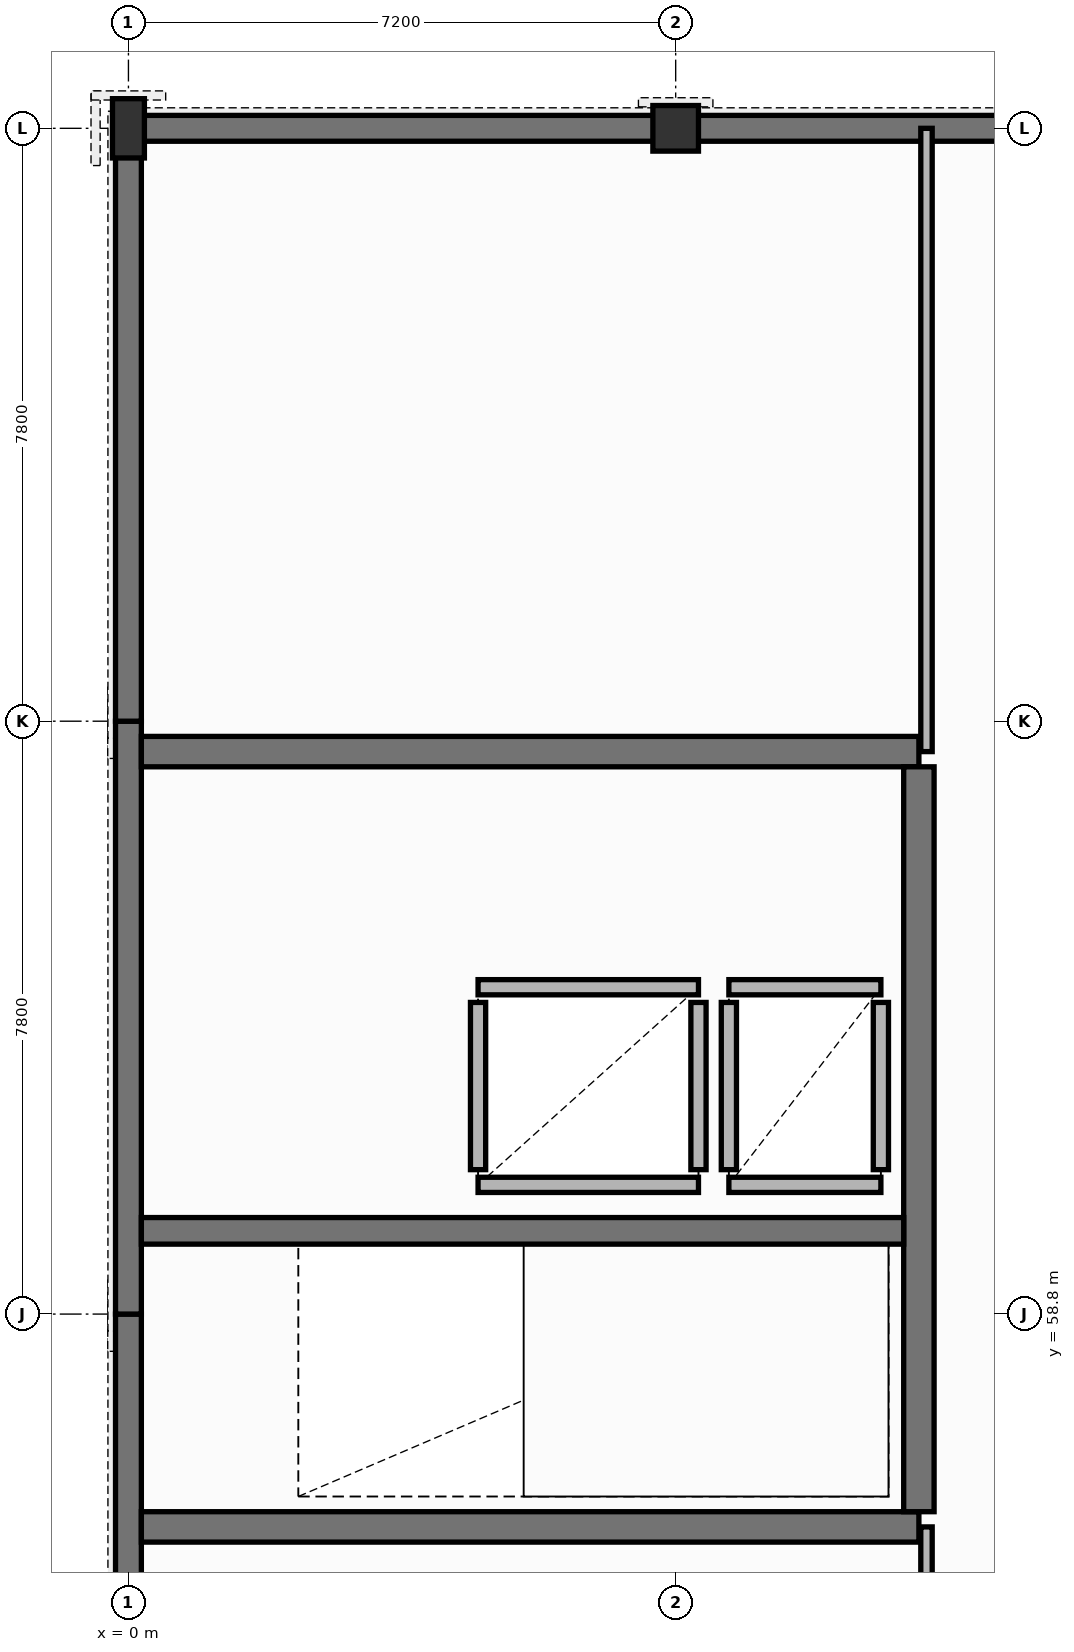
"""IFC4 building model, lengths in metres.
Left out: names, types, materials, properties, quantities, classifications, styles, units other than length and angle.
Written with IfcOpenShell. Run it as: python <this file> out.ifc"""

import sys

from ifc_helpers import new_model, si_unit, direction, frame, frame_2d, origin, origin_2d, place, context, subcontext, project, spatial, rectangle, extrude, element, fill, save


model = new_model("IFC4")
c1 = context("Model", 3, precision=1e-05, world=origin(), true_north=direction((0.0, 1.0)))
c2 = subcontext(c1, "Body", "Model", "MODEL_VIEW")
j1 = project(units=[si_unit("LENGTHUNIT", "METRE"), si_unit("PLANEANGLEUNIT", "RADIAN")], contexts=[c1])
p1 = place(None, origin())
s1 = spatial("IfcSite", under=j1, at=p1, CompositionType="ELEMENT")
p2 = place(p1, origin())
s2 = spatial("IfcBuilding", under=s1, at=p2, CompositionType="ELEMENT")
p3 = place(p2, frame((0.0, 0.0, 8.94)))
s3 = spatial("IfcBuildingStorey", under=s2, at=p3, CompositionType="ELEMENT", Elevation=8.94)
p4 = place(p3, frame((0.0, 74.4, 0.0), z_axis=(0.0, 0.0, 1.0), x_axis=(1.0, 0.0, 0.0)))
e1 = element("IfcColumn", 1, at=p4, inside=s3, PredefinedType="PILASTER", context=c2, shape_type="SweptSolid", body=[
    extrude(rectangle(XDim=0.42, YDim=0.78, at=origin_2d()), origin(), (0.0, 0.0, 1.0), 3.84),
])
p5 = place(p3, frame((7.2, 74.4, 0.0), z_axis=(0.0, 0.0, 1.0), x_axis=(1.0, 0.0, 0.0)))
e2 = element("IfcColumn", 2, at=p5, inside=s3, PredefinedType="COLUMN", context=c2, shape_type="SweptSolid", body=[
    extrude(rectangle(XDim=0.6, YDim=0.6, at=origin_2d()), origin(), (0.0, 0.0, 1.0), 3.84),
])
p6 = place(p3, frame((0.0, 51.0, 0.0), z_axis=(0.0, 0.0, 1.0), x_axis=(0.0, 1.0, 0.0)))
e3 = element("IfcWall", 3, at=p6, inside=s3, PredefinedType="SOLIDWALL", context=c2, shape_type="SweptSolid", body=[
    extrude(rectangle(XDim=7.8, YDim=0.34, at=frame_2d((3.9, 0.0))), origin(), (0.0, 0.0, 1.0), 3.53),
])
p7 = place(p6, frame((1.5, 0.0, 0.85)))
e4 = element("IfcOpeningElement", 4, at=p7, cuts=e3, PredefinedType="OPENING", context=c2, shape_type="SweptSolid", body=[
    extrude(rectangle(XDim=1.95, YDim=2.1, at=frame_2d((0.975, 1.05))), frame((0.0, 0.18, 0.0), z_axis=(0.0, -1.0, 0.0), x_axis=(1.0, 0.0, 0.0)), (0.0, 0.0, 1.0), 0.36),
])
p8 = place(p3, frame((0.0, 58.8, 0.0), z_axis=(0.0, 0.0, 1.0), x_axis=(0.0, 1.0, 0.0)))
e5 = element("IfcWall", 5, at=p8, inside=s3, PredefinedType="SOLIDWALL", context=c2, shape_type="SweptSolid", body=[
    extrude(rectangle(XDim=7.8, YDim=0.34, at=frame_2d((3.9, 0.0))), origin(), (0.0, 0.0, 1.0), 3.53),
])
p9 = place(p8, frame((4.85, 0.0, 1.1)))
e6 = element("IfcOpeningElement", 6, at=p9, cuts=e5, PredefinedType="OPENING", context=c2, shape_type="SweptSolid", body=[
    extrude(rectangle(XDim=1.05, YDim=1.75, at=frame_2d((0.525, 0.875))), frame((0.0, 0.18, 0.0), z_axis=(0.0, -1.0, 0.0), x_axis=(1.0, 0.0, 0.0)), (0.0, 0.0, 1.0), 0.36),
])
p10 = place(p3, frame((0.0, 66.6, 0.0), z_axis=(0.0, 0.0, 1.0), x_axis=(0.0, 1.0, 0.0)))
e7 = element("IfcWall", 7, at=p10, inside=s3, PredefinedType="SOLIDWALL", context=c2, shape_type="SweptSolid", body=[
    extrude(rectangle(XDim=7.8, YDim=0.34, at=frame_2d((3.9, 0.0))), origin(), (0.0, 0.0, 1.0), 3.53),
])
p11 = place(p10, frame((1.5, 0.0, 0.85)))
e8 = element("IfcOpeningElement", 8, at=p11, cuts=e7, PredefinedType="OPENING", context=c2, shape_type="SweptSolid", body=[
    extrude(rectangle(XDim=1.95, YDim=2.1, at=frame_2d((0.975, 1.05))), frame((0.0, 0.18, 0.0), z_axis=(0.0, -1.0, 0.0), x_axis=(1.0, 0.0, 0.0)), (0.0, 0.0, 1.0), 0.36),
])
p12 = place(p10, frame((4.3, 0.0, 0.85)))
e9 = element("IfcOpeningElement", 9, at=p12, cuts=e7, PredefinedType="OPENING", context=c2, shape_type="SweptSolid", body=[
    extrude(rectangle(XDim=1.65, YDim=2.25, at=frame_2d((0.825, 1.125))), frame((0.0, 0.18, 0.0), z_axis=(0.0, -1.0, 0.0), x_axis=(1.0, 0.0, 0.0)), (0.0, 0.0, 1.0), 0.36),
])
p13 = place(p3, frame((0.0, 74.4, 0.0), z_axis=(0.0, 0.0, 1.0), x_axis=(1.0, 0.0, 0.0)))
e10 = element("IfcWall", 10, at=p13, inside=s3, PredefinedType="SOLIDWALL", context=c2, shape_type="SweptSolid", body=[
    extrude(rectangle(XDim=7.2, YDim=0.34, at=frame_2d((3.6, 0.0))), origin(), (0.0, 0.0, 1.0), 3.53),
])
p14 = place(p13, frame((2.2, 0.0, 0.9)))
e11 = element("IfcOpeningElement", 11, at=p14, cuts=e10, PredefinedType="OPENING", context=c2, shape_type="SweptSolid", body=[
    extrude(rectangle(XDim=1.75, YDim=2.15, at=frame_2d((0.875, 1.075))), frame((0.0, 0.18, 0.0), z_axis=(0.0, -1.0, 0.0), x_axis=(1.0, 0.0, 0.0)), (0.0, 0.0, 1.0), 0.36),
])
p15 = place(p3, frame((7.2, 74.4, 0.0), z_axis=(0.0, 0.0, 1.0), x_axis=(1.0, 0.0, 0.0)))
e12 = element("IfcWall", 12, at=p15, inside=s3, PredefinedType="SOLIDWALL", context=c2, shape_type="SweptSolid", body=[
    extrude(rectangle(XDim=7.2, YDim=0.34, at=frame_2d((3.6, 0.0))), origin(), (0.0, 0.0, 1.0), 3.53),
])
p16 = place(p15, frame((4.4, 0.0, 0.9)))
e13 = element("IfcOpeningElement", 13, at=p16, cuts=e12, PredefinedType="OPENING", context=c2, shape_type="SweptSolid", body=[
    extrude(rectangle(XDim=1.75, YDim=2.15, at=frame_2d((0.875, 1.075))), frame((0.0, 0.18, 0.0), z_axis=(0.0, -1.0, 0.0), x_axis=(1.0, 0.0, 0.0)), (0.0, 0.0, 1.0), 0.36),
])
for number, where, z_axis, x_axis in (
    (14, (0.17, 56.0, 0.0), (0.0, 0.0, 1.0), (1.0, 0.0, 0.0)),
    (15, (0.17, 66.2, 0.0), (0.0, 0.0, 1.0), (1.0, 0.0, 0.0)),
):
    element("IfcWall", number, at=place(p3, frame(where, z_axis=z_axis, x_axis=x_axis)), inside=s3, PredefinedType="SHEAR", context=c2, shape_type="SweptSolid", body=[
        extrude(rectangle(XDim=10.23, YDim=0.4, at=frame_2d((5.115, 0.0))), origin(), (0.0, 0.0, 1.0), 3.53),
    ])
p17 = place(p3, frame((10.4, 56.2, 0.0), z_axis=(0.0, 0.0, 1.0), x_axis=(0.0, 1.0, 0.0)))
e16 = element("IfcWall", 16, at=p17, inside=s3, PredefinedType="SHEAR", context=c2, shape_type="SweptSolid", body=[
    extrude(rectangle(XDim=9.8, YDim=0.4, at=frame_2d((4.9, 0.0))), origin(), (0.0, 0.0, 1.0), 3.53),
])
p18 = place(p17, frame((6.8, 0.0, 0.0)))
e17 = element("IfcOpeningElement", 17, at=p18, cuts=e16, PredefinedType="OPENING", context=c2, shape_type="SweptSolid", body=[
    extrude(rectangle(XDim=1.5, YDim=2.2, at=frame_2d((0.75, 1.1))), frame((0.0, 0.21, 0.0), z_axis=(0.0, -1.0, 0.0), x_axis=(1.0, 0.0, 0.0)), (0.0, 0.0, 1.0), 0.42),
])
p19 = place(p3, frame((0.17, 59.895, 0.0), z_axis=(0.0, 0.0, 1.0), x_axis=(1.0, 0.0, 0.0)))
e18 = element("IfcWall", 18, at=p19, inside=s3, PredefinedType="SHEAR", context=c2, shape_type="SweptSolid", body=[
    extrude(rectangle(XDim=10.03, YDim=0.35, at=frame_2d((5.015, 0.0))), origin(), (0.0, 0.0, 1.0), 3.53),
])
p20 = place(p19, frame((0.45, 0.0, 0.0)))
e19 = element("IfcOpeningElement", 19, at=p20, cuts=e18, PredefinedType="OPENING", context=c2, shape_type="SweptSolid", body=[
    extrude(rectangle(XDim=1.05, YDim=2.2, at=frame_2d((0.525, 1.1))), frame((0.0, 0.185, 0.0), z_axis=(0.0, -1.0, 0.0), x_axis=(1.0, 0.0, 0.0)), (0.0, 0.0, 1.0), 0.37),
])
p21 = place(p3, frame((4.6, 60.5, 0.0), z_axis=(0.0, 0.0, 1.0), x_axis=(1.0, 0.0, 0.0)))
e20 = element("IfcWall", 20, at=p21, inside=s3, PredefinedType="PARTITIONING", context=c2, shape_type="SweptSolid", body=[
    extrude(rectangle(XDim=2.9, YDim=0.2, at=frame_2d((1.45, 0.0))), origin(), (0.0, 0.0, 1.0), 3.53),
])
p22 = place(p3, frame((4.6, 63.1, 0.0), z_axis=(0.0, 0.0, 1.0), x_axis=(1.0, 0.0, 0.0)))
e21 = element("IfcWall", 21, at=p22, inside=s3, PredefinedType="PARTITIONING", context=c2, shape_type="SweptSolid", body=[
    extrude(rectangle(XDim=2.9, YDim=0.2, at=frame_2d((1.45, 0.0))), origin(), (0.0, 0.0, 1.0), 3.53),
])
p23 = place(p22, frame((0.75, 0.0, 0.0)))
e22 = element("IfcOpeningElement", 22, at=p23, cuts=e21, PredefinedType="OPENING", context=c2, shape_type="SweptSolid", body=[
    extrude(rectangle(XDim=1.4, YDim=2.25, at=frame_2d((0.7, 1.125))), frame((0.0, 0.11, 0.0), z_axis=(0.0, -1.0, 0.0), x_axis=(1.0, 0.0, 0.0)), (0.0, 0.0, 1.0), 0.22),
])
for number, where, z_axis, x_axis in (
    (23, (4.6, 60.7, 0.0), (0.0, 0.0, 1.0), (0.0, 1.0, 0.0)),
    (24, (7.5, 60.7, 0.0), (0.0, 0.0, 1.0), (0.0, 1.0, 0.0)),
):
    element("IfcWall", number, at=place(p3, frame(where, z_axis=z_axis, x_axis=x_axis)), inside=s3, PredefinedType="PARTITIONING", context=c2, shape_type="SweptSolid", body=[
        extrude(rectangle(XDim=2.2, YDim=0.2, at=frame_2d((1.1, 0.0))), origin(), (0.0, 0.0, 1.0), 3.53),
    ])
p24 = place(p3, frame((7.9, 60.5, 0.0), z_axis=(0.0, 0.0, 1.0), x_axis=(1.0, 0.0, 0.0)))
e25 = element("IfcWall", 25, at=p24, inside=s3, PredefinedType="PARTITIONING", context=c2, shape_type="SweptSolid", body=[
    extrude(rectangle(XDim=2.0, YDim=0.2, at=frame_2d((1.0, 0.0))), origin(), (0.0, 0.0, 1.0), 3.53),
])
p25 = place(p3, frame((7.9, 63.1, 0.0), z_axis=(0.0, 0.0, 1.0), x_axis=(1.0, 0.0, 0.0)))
e26 = element("IfcWall", 26, at=p25, inside=s3, PredefinedType="PARTITIONING", context=c2, shape_type="SweptSolid", body=[
    extrude(rectangle(XDim=2.0, YDim=0.2, at=frame_2d((1.0, 0.0))), origin(), (0.0, 0.0, 1.0), 3.53),
])
p26 = place(p25, frame((0.55, 0.0, 0.0)))
e27 = element("IfcOpeningElement", 27, at=p26, cuts=e26, PredefinedType="OPENING", context=c2, shape_type="SweptSolid", body=[
    extrude(rectangle(XDim=0.9, YDim=2.1, at=frame_2d((0.45, 1.05))), frame((0.0, 0.11, 0.0), z_axis=(0.0, -1.0, 0.0), x_axis=(1.0, 0.0, 0.0)), (0.0, 0.0, 1.0), 0.22),
])
for number, where, z_axis, x_axis in (
    (28, (7.9, 60.7, 0.0), (0.0, 0.0, 1.0), (0.0, 1.0, 0.0)),
    (29, (9.9, 60.7, 0.0), (0.0, 0.0, 1.0), (0.0, 1.0, 0.0)),
):
    element("IfcWall", number, at=place(p3, frame(where, z_axis=z_axis, x_axis=x_axis)), inside=s3, PredefinedType="PARTITIONING", context=c2, shape_type="SweptSolid", body=[
        extrude(rectangle(XDim=2.2, YDim=0.2, at=frame_2d((1.1, 0.0))), origin(), (0.0, 0.0, 1.0), 3.53),
    ])
p27 = place(p3, frame((10.5, 36.0, 0.0), z_axis=(0.0, 0.0, 1.0), x_axis=(0.0, 1.0, 0.0)))
e30 = element("IfcWall", 30, at=p27, inside=s3, PredefinedType="PARTITIONING", context=c2, shape_type="SweptSolid", body=[
    extrude(rectangle(XDim=20.0, YDim=0.15, at=frame_2d((10.0, 0.0))), origin(), (0.0, 0.0, 1.0), 3.53),
])
p28 = place(p27, frame((9.0, 0.0, 0.0)))
e31 = element("IfcOpeningElement", 31, at=p28, cuts=e30, PredefinedType="OPENING", context=c2, shape_type="SweptSolid", body=[
    extrude(rectangle(XDim=1.0, YDim=2.15, at=frame_2d((0.5, 1.075))), frame((0.0, 0.085, 0.0), z_axis=(0.0, -1.0, 0.0), x_axis=(1.0, 0.0, 0.0)), (0.0, 0.0, 1.0), 0.17),
])
p29 = place(p3, frame((10.5, 66.2, 0.0), z_axis=(0.0, 0.0, 1.0), x_axis=(0.0, 1.0, 0.0)))
e32 = element("IfcWall", 32, at=p29, inside=s3, PredefinedType="PARTITIONING", context=c2, shape_type="SweptSolid", body=[
    extrude(rectangle(XDim=8.2, YDim=0.15, at=frame_2d((4.1, 0.0))), origin(), (0.0, 0.0, 1.0), 3.53),
])
p30 = place(p29, frame((3.2, 0.0, 0.0)))
e33 = element("IfcOpeningElement", 33, at=p30, cuts=e32, PredefinedType="OPENING", context=c2, shape_type="SweptSolid", body=[
    extrude(rectangle(XDim=1.0, YDim=2.15, at=frame_2d((0.5, 1.075))), frame((0.0, 0.085, 0.0), z_axis=(0.0, -1.0, 0.0), x_axis=(1.0, 0.0, 0.0)), (0.0, 0.0, 1.0), 0.17),
])
p31 = place(p9, origin())
e34 = element("IfcWindow", 34, at=p31, inside=s3, PartitioningType="SINGLE_PANEL", PredefinedType="WINDOW", context=c2, shape_type="SweptSolid", body=[
    extrude(rectangle(XDim=1.05, YDim=1.75, at=frame_2d((0.525, 0.875))), frame((0.0, 0.03, 0.0), z_axis=(0.0, -1.0, 0.0), x_axis=(1.0, 0.0, 0.0)), (0.0, 0.0, 1.0), 0.06),
])
fill(e6, e34)
p32 = place(p11, origin())
e35 = element("IfcWindow", 35, at=p32, inside=s3, PartitioningType="SINGLE_PANEL", PredefinedType="WINDOW", context=c2, shape_type="SweptSolid", body=[
    extrude(rectangle(XDim=1.95, YDim=2.1, at=frame_2d((0.975, 1.05))), frame((0.0, 0.03, 0.0), z_axis=(0.0, -1.0, 0.0), x_axis=(1.0, 0.0, 0.0)), (0.0, 0.0, 1.0), 0.06),
])
fill(e8, e35)
p33 = place(p12, origin())
e36 = element("IfcWindow", 36, at=p33, inside=s3, PartitioningType="SINGLE_PANEL", PredefinedType="WINDOW", context=c2, shape_type="SweptSolid", body=[
    extrude(rectangle(XDim=1.65, YDim=2.25, at=frame_2d((0.825, 1.125))), frame((0.0, 0.03, 0.0), z_axis=(0.0, -1.0, 0.0), x_axis=(1.0, 0.0, 0.0)), (0.0, 0.0, 1.0), 0.06),
])
fill(e9, e36)
p34 = place(p14, origin())
e37 = element("IfcWindow", 37, at=p34, inside=s3, PartitioningType="SINGLE_PANEL", PredefinedType="WINDOW", context=c2, shape_type="SweptSolid", body=[
    extrude(rectangle(XDim=1.75, YDim=2.15, at=frame_2d((0.875, 1.075))), frame((0.0, 0.03, 0.0), z_axis=(0.0, -1.0, 0.0), x_axis=(1.0, 0.0, 0.0)), (0.0, 0.0, 1.0), 0.06),
])
fill(e11, e37)
p35 = place(p18, origin())
e38 = element("IfcDoor", 38, at=p35, inside=s3, OperationType="DOUBLE_DOOR_SINGLE_SWING", PredefinedType="DOOR", context=c2, shape_type="SweptSolid", body=[
    extrude(rectangle(XDim=1.5, YDim=2.2, at=frame_2d((0.75, 1.1))), frame((0.0, 0.025, 0.0), z_axis=(0.0, -1.0, 0.0), x_axis=(1.0, 0.0, 0.0)), (0.0, 0.0, 1.0), 0.05),
])
fill(e17, e38)
p36 = place(p20, origin())
e39 = element("IfcDoor", 39, at=p36, inside=s3, OperationType="SINGLE_SWING_LEFT", PredefinedType="DOOR", context=c2, shape_type="SweptSolid", body=[
    extrude(rectangle(XDim=1.05, YDim=2.2, at=frame_2d((0.525, 1.1))), frame((0.0, 0.025, 0.0), z_axis=(0.0, -1.0, 0.0), x_axis=(1.0, 0.0, 0.0)), (0.0, 0.0, 1.0), 0.05),
])
fill(e19, e39)
p37 = place(p23, origin())
e40 = element("IfcDoor", 40, at=p37, inside=s3, OperationType="SLIDING_TO_LEFT", PredefinedType="DOOR", context=c2, shape_type="SweptSolid", body=[
    extrude(rectangle(XDim=1.4, YDim=2.25, at=frame_2d((0.7, 1.125))), frame((0.0, 0.025, 0.0), z_axis=(0.0, -1.0, 0.0), x_axis=(1.0, 0.0, 0.0)), (0.0, 0.0, 1.0), 0.05),
])
fill(e22, e40)
p38 = place(p26, origin())
e41 = element("IfcDoor", 41, at=p38, inside=s3, OperationType="SINGLE_SWING_LEFT", PredefinedType="DOOR", context=c2, shape_type="SweptSolid", body=[
    extrude(rectangle(XDim=0.9, YDim=2.1, at=frame_2d((0.45, 1.05))), frame((0.0, 0.025, 0.0), z_axis=(0.0, -1.0, 0.0), x_axis=(1.0, 0.0, 0.0)), (0.0, 0.0, 1.0), 0.05),
])
fill(e27, e41)
p39 = place(p30, origin())
e42 = element("IfcDoor", 42, at=p39, inside=s3, OperationType="SINGLE_SWING_LEFT", PredefinedType="DOOR", context=c2, shape_type="SweptSolid", body=[
    extrude(rectangle(XDim=1.0, YDim=2.15, at=frame_2d((0.5, 1.075))), frame((0.0, 0.025, 0.0), z_axis=(0.0, -1.0, 0.0), x_axis=(1.0, 0.0, 0.0)), (0.0, 0.0, 1.0), 0.05),
])
fill(e33, e42)
save(model, sys.argv[1])
